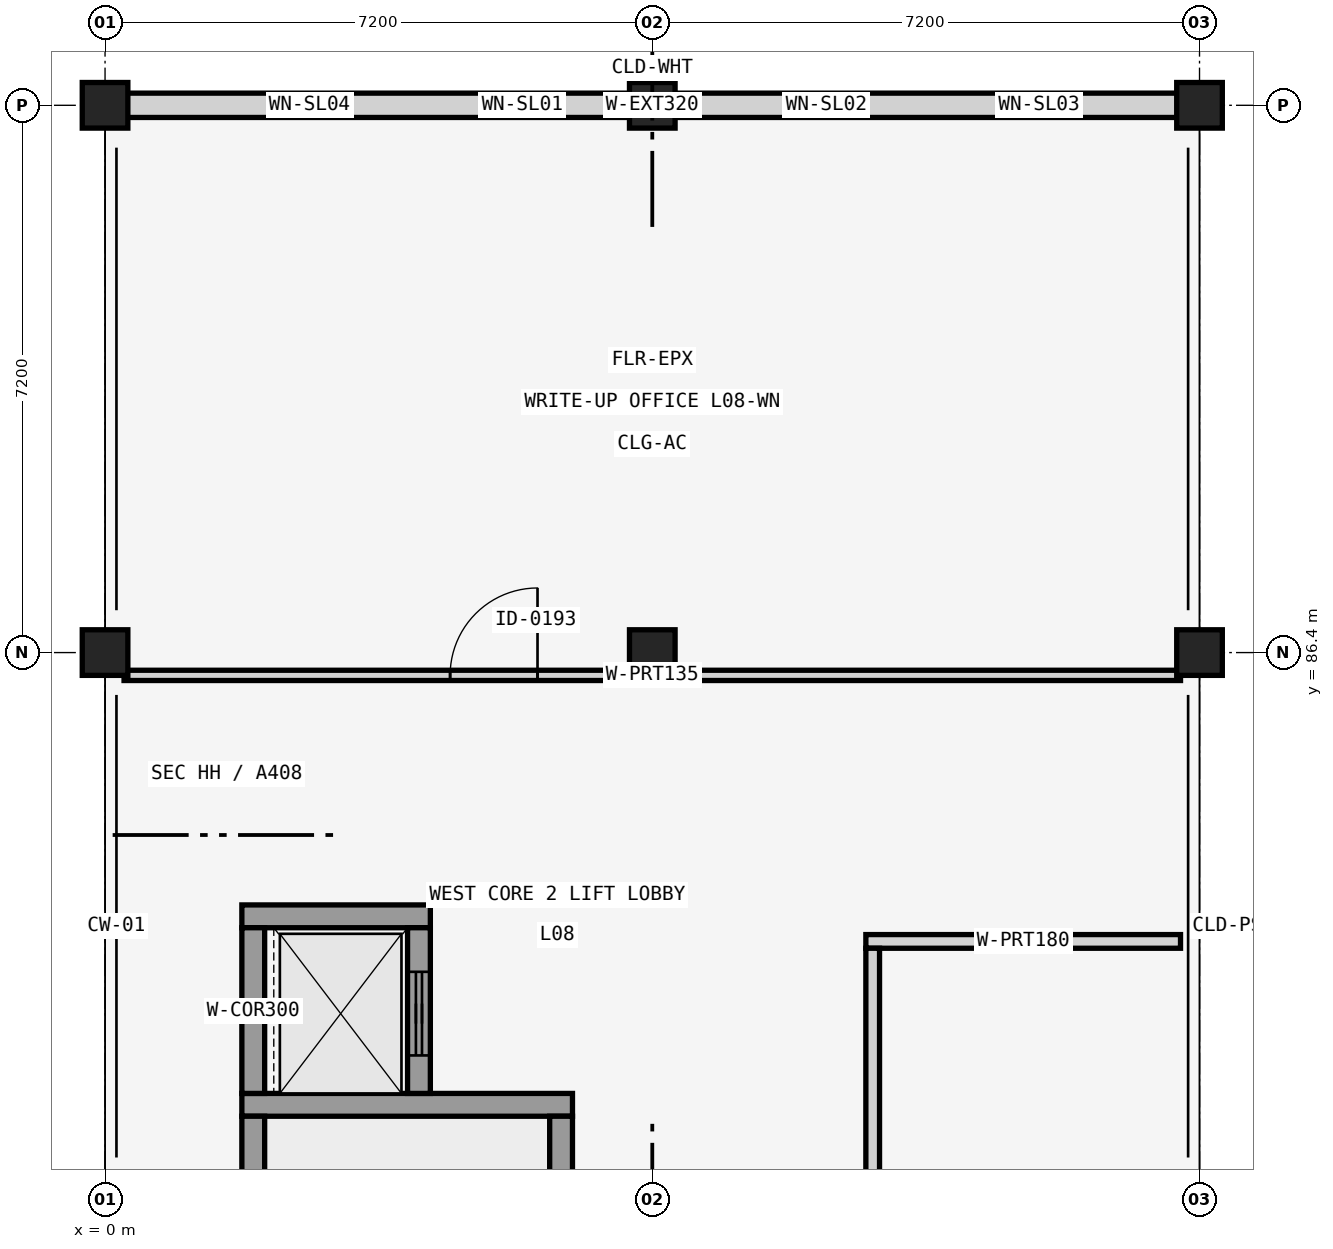
"""IFC4 building model, lengths in metres.
Left out: names, types, materials, properties, quantities, classifications, styles, units other than length and angle.
Written with IfcOpenShell. Run it as: python <this file> out.ifc"""

import sys

from ifc_helpers import new_model, si_unit, direction, frame, frame_2d, origin, origin_2d, place, context, subcontext, project, spatial, rectangle, extrude, element, fill, save


model = new_model("IFC4")
c1 = context("Model", 3, precision=1e-05, world=origin(), true_north=direction((0.0, 1.0)))
c2 = subcontext(c1, "Body", "Model", "MODEL_VIEW")
j1 = project(units=[si_unit("LENGTHUNIT", "METRE"), si_unit("PLANEANGLEUNIT", "RADIAN")], contexts=[c1])
p1 = place(None, origin())
s1 = spatial("IfcSite", under=j1, at=p1, CompositionType="ELEMENT")
p2 = place(p1, origin())
s2 = spatial("IfcBuilding", under=s1, at=p2, CompositionType="ELEMENT")
p3 = place(p2, frame((0.0, 0.0, 33.92)))
s3 = spatial("IfcBuildingStorey", under=s2, at=p3, CompositionType="ELEMENT", Elevation=33.92)
for number, where, z_axis, x_axis in (
    (1, (0.0, 86.4, 0.0), (0.0, 0.0, 1.0), (1.0, 0.0, 0.0)),
    (2, (0.0, 93.6, 0.0), (0.0, 0.0, 1.0), (1.0, 0.0, 0.0)),
    (3, (7.2, 86.4, 0.0), (0.0, 0.0, 1.0), (1.0, 0.0, 0.0)),
    (4, (7.2, 93.6, 0.0), (0.0, 0.0, 1.0), (1.0, 0.0, 0.0)),
    (5, (14.4, 86.4, 0.0), (0.0, 0.0, 1.0), (1.0, 0.0, 0.0)),
    (6, (14.4, 93.6, 0.0), (0.0, 0.0, 1.0), (1.0, 0.0, 0.0)),
):
    element("IfcColumn", number, at=place(p3, frame(where, z_axis=z_axis, x_axis=x_axis)), inside=s3, PredefinedType="COLUMN", context=c2, shape_type="SweptSolid", body=[
        extrude(rectangle(XDim=0.6, YDim=0.6, at=origin_2d()), origin(), (0.0, 0.0, 1.0), 4.16),
    ])
p4 = place(p3, frame((0.29, 93.6, 0.0), z_axis=(0.0, 0.0, 1.0), x_axis=(1.0, 0.0, 0.0)))
e7 = element("IfcWall", 7, at=p4, inside=s3, PredefinedType="SOLIDWALL", context=c2, shape_type="SweptSolid", body=[
    extrude(rectangle(XDim=13.82, YDim=0.32, at=frame_2d((6.91, 0.0))), origin(), (0.0, 0.0, 1.0), 3.21),
])
p5 = place(p4, frame((2.175, 0.0, 0.85)))
e8 = element("IfcOpeningElement", 8, at=p5, cuts=e7, PredefinedType="OPENING", context=c2, shape_type="SweptSolid", body=[
    extrude(rectangle(XDim=0.45, YDim=2.1, at=frame_2d((0.225, 1.05))), frame((0.0, 0.17, 0.0), z_axis=(0.0, -1.0, 0.0), x_axis=(1.0, 0.0, 0.0)), (0.0, 0.0, 1.0), 0.34),
])
p6 = place(p4, frame((4.975, 0.0, 0.65)))
e9 = element("IfcOpeningElement", 9, at=p6, cuts=e7, PredefinedType="OPENING", context=c2, shape_type="SweptSolid", body=[
    extrude(rectangle(XDim=0.45, YDim=2.4, at=frame_2d((0.225, 1.2))), frame((0.0, 0.17, 0.0), z_axis=(0.0, -1.0, 0.0), x_axis=(1.0, 0.0, 0.0)), (0.0, 0.0, 1.0), 0.34),
])
p7 = place(p4, frame((8.95, 0.0, 0.65)))
e10 = element("IfcOpeningElement", 10, at=p7, cuts=e7, PredefinedType="OPENING", context=c2, shape_type="SweptSolid", body=[
    extrude(rectangle(XDim=0.5, YDim=2.4, at=frame_2d((0.25, 1.2))), frame((0.0, 0.17, 0.0), z_axis=(0.0, -1.0, 0.0), x_axis=(1.0, 0.0, 0.0)), (0.0, 0.0, 1.0), 0.34),
])
p8 = place(p4, frame((11.725, 0.0, 0.85)))
e11 = element("IfcOpeningElement", 11, at=p8, cuts=e7, PredefinedType="OPENING", context=c2, shape_type="SweptSolid", body=[
    extrude(rectangle(XDim=0.55, YDim=2.2, at=frame_2d((0.275, 1.1))), frame((0.0, 0.17, 0.0), z_axis=(0.0, -1.0, 0.0), x_axis=(1.0, 0.0, 0.0)), (0.0, 0.0, 1.0), 0.34),
])
p9 = place(p3, frame((1.8, 80.45, 0.0), z_axis=(0.0, 0.0, 1.0), x_axis=(1.0, 0.0, 0.0)))
e12 = element("IfcWall", 12, at=p9, inside=s3, PredefinedType="SHEAR", context=c2, shape_type="SweptSolid", body=[
    extrude(rectangle(XDim=4.35, YDim=0.3, at=frame_2d((2.175, 0.0))), origin(), (0.0, 0.0, 1.0), 3.81),
])
p10 = place(p3, frame((1.95, 72.5, 0.0), z_axis=(0.0, 0.0, 1.0), x_axis=(0.0, 1.0, 0.0)))
e13 = element("IfcWall", 13, at=p10, inside=s3, PredefinedType="SHEAR", context=c2, shape_type="SweptSolid", body=[
    extrude(rectangle(XDim=7.8, YDim=0.3, at=frame_2d((3.9, 0.0))), origin(), (0.0, 0.0, 1.0), 3.81),
])
p11 = place(p3, frame((6.0, 72.5, 0.0), z_axis=(0.0, 0.0, 1.0), x_axis=(0.0, 1.0, 0.0)))
e14 = element("IfcWall", 14, at=p11, inside=s3, PredefinedType="SHEAR", context=c2, shape_type="SweptSolid", body=[
    extrude(rectangle(XDim=7.8, YDim=0.3, at=frame_2d((3.9, 0.0))), origin(), (0.0, 0.0, 1.0), 3.81),
])
p12 = place(p11, frame((0.4, 0.0, 0.0)))
e15 = element("IfcOpeningElement", 15, at=p12, cuts=e14, PredefinedType="OPENING", context=c2, shape_type="SweptSolid", body=[
    extrude(rectangle(XDim=1.15, YDim=2.2, at=frame_2d((0.575, 1.1))), frame((0.0, 0.16, 0.0), z_axis=(0.0, -1.0, 0.0), x_axis=(1.0, 0.0, 0.0)), (0.0, 0.0, 1.0), 0.32),
])
p13 = place(p3, frame((1.8, 82.93, 0.0), z_axis=(0.0, 0.0, 1.0), x_axis=(1.0, 0.0, 0.0)))
e16 = element("IfcWall", 16, at=p13, inside=s3, PredefinedType="SHEAR", context=c2, shape_type="SweptSolid", body=[
    extrude(rectangle(XDim=2.48, YDim=0.3, at=frame_2d((1.24, 0.0))), origin(), (0.0, 0.0, 1.0), 3.81),
])
p14 = place(p3, frame((1.95, 80.6, 0.0), z_axis=(0.0, 0.0, 1.0), x_axis=(0.0, 1.0, 0.0)))
e17 = element("IfcWall", 17, at=p14, inside=s3, PredefinedType="SHEAR", context=c2, shape_type="SweptSolid", body=[
    extrude(rectangle(XDim=2.18, YDim=0.3, at=frame_2d((1.09, 0.0))), origin(), (0.0, 0.0, 1.0), 3.81),
])
p15 = place(p3, frame((4.13, 80.6, 0.0), z_axis=(0.0, 0.0, 1.0), x_axis=(0.0, 1.0, 0.0)))
e18 = element("IfcWall", 18, at=p15, inside=s3, PredefinedType="SHEAR", context=c2, shape_type="SweptSolid", body=[
    extrude(rectangle(XDim=2.18, YDim=0.3, at=frame_2d((1.09, 0.0))), origin(), (0.0, 0.0, 1.0), 3.81),
])
p16 = place(p15, frame((0.5, 0.0, 0.0)))
e19 = element("IfcOpeningElement", 19, at=p16, cuts=e18, PredefinedType="OPENING", context=c2, shape_type="SweptSolid", body=[
    extrude(rectangle(XDim=1.1, YDim=2.2, at=frame_2d((0.55, 1.1))), frame((0.0, 0.16, 0.0), z_axis=(0.0, -1.0, 0.0), x_axis=(1.0, 0.0, 0.0)), (0.0, 0.0, 1.0), 0.32),
])
p17 = place(p3, frame((0.25, 86.1, 0.0), z_axis=(0.0, 0.0, 1.0), x_axis=(1.0, 0.0, 0.0)))
e20 = element("IfcWall", 20, at=p17, inside=s3, PredefinedType="PARTITIONING", context=c2, shape_type="SweptSolid", body=[
    extrude(rectangle(XDim=13.9, YDim=0.135, at=frame_2d((6.95, 0.0))), origin(), (0.0, 0.0, 1.0), 3.21),
])
p18 = place(p17, frame((4.29, 0.0, 0.0)))
e21 = element("IfcOpeningElement", 21, at=p18, cuts=e20, PredefinedType="OPENING", context=c2, shape_type="SweptSolid", body=[
    extrude(rectangle(XDim=1.15, YDim=2.15, at=frame_2d((0.575, 1.075))), frame((0.0, 0.078, 0.0), z_axis=(0.0, -1.0, 0.0), x_axis=(1.0, 0.0, 0.0)), (0.0, 0.0, 1.0), 0.155),
])
p19 = place(p3, frame((10.01, 82.6, 0.0), z_axis=(0.0, 0.0, 1.0), x_axis=(1.0, 0.0, 0.0)))
e22 = element("IfcWall", 22, at=p19, inside=s3, PredefinedType="PARTITIONING", context=c2, shape_type="SweptSolid", body=[
    extrude(rectangle(XDim=4.14, YDim=0.18, at=frame_2d((2.07, 0.0))), origin(), (0.0, 0.0, 1.0), 3.21),
])
p20 = place(p3, frame((10.1, 68.3, 0.0), z_axis=(0.0, 0.0, 1.0), x_axis=(0.0, 1.0, 0.0)))
e23 = element("IfcWall", 23, at=p20, inside=s3, PredefinedType="PARTITIONING", context=c2, shape_type="SweptSolid", body=[
    extrude(rectangle(XDim=14.21, YDim=0.18, at=frame_2d((7.105, 0.0))), origin(), (0.0, 0.0, 1.0), 3.21),
])
p21 = place(p20, frame((6.65, 0.0, 0.0)))
e24 = element("IfcOpeningElement", 24, at=p21, cuts=e23, PredefinedType="OPENING", context=c2, shape_type="SweptSolid", body=[
    extrude(rectangle(XDim=0.91, YDim=2.08, at=frame_2d((0.455, 1.04))), frame((0.0, 0.1, 0.0), z_axis=(0.0, -1.0, 0.0), x_axis=(1.0, 0.0, 0.0)), (0.0, 0.0, 1.0), 0.2),
])
p22 = place(p5, origin())
e25 = element("IfcWindow", 25, at=p22, inside=s3, PartitioningType="SINGLE_PANEL", PredefinedType="WINDOW", context=c2, shape_type="SweptSolid", body=[
    extrude(rectangle(XDim=0.45, YDim=2.1, at=frame_2d((0.225, 1.05))), frame((0.0, 0.03, 0.0), z_axis=(0.0, -1.0, 0.0), x_axis=(1.0, 0.0, 0.0)), (0.0, 0.0, 1.0), 0.06),
])
fill(e8, e25)
p23 = place(p6, origin())
e26 = element("IfcWindow", 26, at=p23, inside=s3, PartitioningType="SINGLE_PANEL", PredefinedType="WINDOW", context=c2, shape_type="SweptSolid", body=[
    extrude(rectangle(XDim=0.45, YDim=2.4, at=frame_2d((0.225, 1.2))), frame((0.0, 0.03, 0.0), z_axis=(0.0, -1.0, 0.0), x_axis=(1.0, 0.0, 0.0)), (0.0, 0.0, 1.0), 0.06),
])
fill(e9, e26)
p24 = place(p7, origin())
e27 = element("IfcWindow", 27, at=p24, inside=s3, PartitioningType="SINGLE_PANEL", PredefinedType="WINDOW", context=c2, shape_type="SweptSolid", body=[
    extrude(rectangle(XDim=0.5, YDim=2.4, at=frame_2d((0.25, 1.2))), frame((0.0, 0.03, 0.0), z_axis=(0.0, -1.0, 0.0), x_axis=(1.0, 0.0, 0.0)), (0.0, 0.0, 1.0), 0.06),
])
fill(e10, e27)
p25 = place(p8, origin())
e28 = element("IfcWindow", 28, at=p25, inside=s3, PartitioningType="SINGLE_PANEL", PredefinedType="WINDOW", context=c2, shape_type="SweptSolid", body=[
    extrude(rectangle(XDim=0.55, YDim=2.2, at=frame_2d((0.275, 1.1))), frame((0.0, 0.03, 0.0), z_axis=(0.0, -1.0, 0.0), x_axis=(1.0, 0.0, 0.0)), (0.0, 0.0, 1.0), 0.06),
])
fill(e11, e28)
p26 = place(p16, origin())
e29 = element("IfcDoor", 29, at=p26, inside=s3, OperationType="SLIDING_TO_LEFT", PredefinedType="DOOR", context=c2, shape_type="SweptSolid", body=[
    extrude(rectangle(XDim=1.1, YDim=2.2, at=frame_2d((0.55, 1.1))), frame((0.0, 0.025, 0.0), z_axis=(0.0, -1.0, 0.0), x_axis=(1.0, 0.0, 0.0)), (0.0, 0.0, 1.0), 0.05),
])
fill(e19, e29)
p27 = place(p18, origin())
e30 = element("IfcDoor", 30, at=p27, inside=s3, OperationType="SINGLE_SWING_RIGHT", PredefinedType="DOOR", context=c2, shape_type="SweptSolid", body=[
    extrude(rectangle(XDim=1.15, YDim=2.15, at=frame_2d((0.575, 1.075))), frame((0.0, 0.025, 0.0), z_axis=(0.0, -1.0, 0.0), x_axis=(1.0, 0.0, 0.0)), (0.0, 0.0, 1.0), 0.05),
])
fill(e21, e30)
save(model, sys.argv[1])
